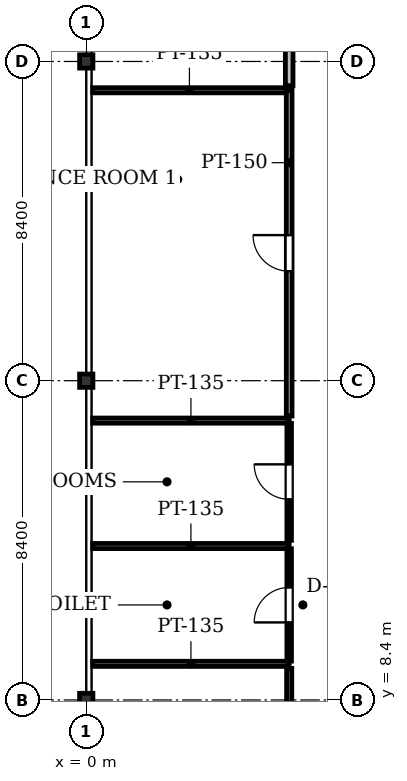
"""IFC4 building model, lengths in metres.
Left out: names, types, materials, properties, quantities, classifications, styles, units other than length and angle.
Written with IfcOpenShell. Run it as: python <this file> out.ifc"""

import sys

from ifc_helpers import new_model, si_unit, direction, frame, frame_2d, origin, origin_2d, place, context, subcontext, project, spatial, rectangle, i_section, extrude, element, fill, save


model = new_model("IFC4")
c1 = context("Model", 3, precision=1e-05, world=origin(), true_north=direction((0.0, 1.0)))
c2 = subcontext(c1, "Body", "Model", "MODEL_VIEW")
j1 = project(units=[si_unit("LENGTHUNIT", "METRE"), si_unit("PLANEANGLEUNIT", "RADIAN")], contexts=[c1])
p1 = place(None, origin())
s1 = spatial("IfcSite", under=j1, at=p1, CompositionType="ELEMENT")
p2 = place(p1, origin())
s2 = spatial("IfcBuilding", under=s1, at=p2, CompositionType="ELEMENT")
p3 = place(p2, frame((0.0, 0.0, 167.3)))
s3 = spatial("IfcBuildingStorey", under=s2, at=p3, CompositionType="ELEMENT", Elevation=167.3)
for number, where, z_axis, x_axis in (
    (1, (0.0, 8.4, 0.0), (0.0, 0.0, 1.0), (1.0, 0.0, 0.0)),
    (2, (0.0, 16.8, 0.0), (0.0, 0.0, 1.0), (1.0, 0.0, 0.0)),
    (3, (0.0, 25.2, 0.0), (0.0, 0.0, 1.0), (1.0, 0.0, 0.0)),
):
    element("IfcColumn", number, at=place(p3, frame(where, z_axis=z_axis, x_axis=x_axis)), inside=s3, PredefinedType="COLUMN", context=c2, shape_type="SweptSolid", body=[
        extrude(i_section(OverallWidth=0.35, OverallDepth=0.35, WebThickness=0.02, FlangeThickness=0.032, at=origin_2d()), origin(), (0.0, 0.0, 1.0), 4.1),
    ])
for number, where, z_axis, x_axis in (
    (4, (5.34, 12.45, 0.0), (0.0, 0.0, 1.0), (-1.0, 0.0, 0.0)),
    (5, (0.169, 9.35, 0.0), (0.0, 0.0, 1.0), (1.0, 0.0, 0.0)),
):
    element("IfcWall", number, at=place(p3, frame(where, z_axis=z_axis, x_axis=x_axis)), inside=s3, PredefinedType="PARTITIONING", context=c2, shape_type="SweptSolid", body=[
        extrude(rectangle(XDim=5.171, YDim=0.135, at=frame_2d((2.585, 0.0))), origin(), (0.0, 0.0, 1.0), 3.518),
    ])
p4 = place(p3, frame((5.34, 9.421, 0.0), z_axis=(0.0, 0.0, 1.0), x_axis=(0.0, 1.0, 0.0)))
e6 = element("IfcWall", 6, at=p4, inside=s3, PredefinedType="PARTITIONING", context=c2, shape_type="SweptSolid", body=[
    extrude(rectangle(XDim=2.957, YDim=0.12, at=frame_2d((1.479, 0.0))), origin(), (0.0, 0.0, 1.0), 3.825),
])
p5 = place(p4, frame((1.019, 0.0, 0.0)))
e7 = element("IfcOpeningElement", 7, at=p5, cuts=e6, PredefinedType="OPENING", context=c2, shape_type="SweptSolid", body=[
    extrude(rectangle(XDim=0.92, YDim=2.1, at=frame_2d((0.46, 1.05))), frame((0.0, 0.07, 0.0), z_axis=(0.0, -1.0, 0.0), x_axis=(1.0, 0.0, 0.0)), (0.0, 0.0, 1.0), 0.14),
])
p6 = place(p3, frame((5.34, 15.75, 0.0), z_axis=(0.0, 0.0, 1.0), x_axis=(-1.0, 0.0, 0.0)))
e8 = element("IfcWall", 8, at=p6, inside=s3, PredefinedType="PARTITIONING", context=c2, shape_type="SweptSolid", body=[
    extrude(rectangle(XDim=5.171, YDim=0.135, at=frame_2d((2.585, 0.0))), origin(), (0.0, 0.0, 1.0), 3.518),
])
p7 = place(p3, frame((5.34, 12.6, 0.0), z_axis=(0.0, 0.0, 1.0), x_axis=(0.0, 1.0, 0.0)))
e9 = element("IfcWall", 9, at=p7, inside=s3, PredefinedType="PARTITIONING", context=c2, shape_type="SweptSolid", body=[
    extrude(rectangle(XDim=3.078, YDim=0.12, at=frame_2d((1.539, 0.0))), origin(), (0.0, 0.0, 1.0), 3.825),
])
p8 = place(p7, frame((1.079, 0.0, 0.0)))
e10 = element("IfcOpeningElement", 10, at=p8, cuts=e9, PredefinedType="OPENING", context=c2, shape_type="SweptSolid", body=[
    extrude(rectangle(XDim=0.92, YDim=2.1, at=frame_2d((0.46, 1.05))), frame((0.0, 0.07, 0.0), z_axis=(0.0, -1.0, 0.0), x_axis=(1.0, 0.0, 0.0)), (0.0, 0.0, 1.0), 0.14),
])
p9 = place(p3, frame((5.34, 15.87, 0.0), z_axis=(0.0, 0.0, 1.0), x_axis=(0.0, 1.0, 0.0)))
e11 = element("IfcWall", 11, at=p9, inside=s3, PredefinedType="PARTITIONING", context=c2, shape_type="SweptSolid", body=[
    extrude(rectangle(XDim=8.572, YDim=0.15, at=frame_2d((4.286, 0.0))), origin(), (0.0, 0.0, 1.0), 2.425),
])
p10 = place(p9, frame((3.811, 0.0, 0.0)))
e12 = element("IfcOpeningElement", 12, at=p10, cuts=e11, PredefinedType="OPENING", context=c2, shape_type="SweptSolid", body=[
    extrude(rectangle(XDim=0.95, YDim=2.15, at=frame_2d((0.475, 1.075))), frame((0.0, 0.085, 0.0), z_axis=(0.0, -1.0, 0.0), x_axis=(1.0, 0.0, 0.0)), (0.0, 0.0, 1.0), 0.17),
])
p11 = place(p3, frame((5.261, 24.442, 0.0), z_axis=(0.0, 0.0, 1.0), x_axis=(-1.0, 0.0, 0.0)))
e13 = element("IfcWall", 13, at=p11, inside=s3, PredefinedType="PARTITIONING", context=c2, shape_type="SweptSolid", body=[
    extrude(rectangle(XDim=5.092, YDim=0.135, at=frame_2d((2.546, 0.0))), origin(), (0.0, 0.0, 1.0), 3.518),
])
p12 = place(p3, frame((5.34, 5.4, 0.0), z_axis=(0.0, 0.0, 1.0), x_axis=(0.0, 1.0, 0.0)))
e14 = element("IfcWall", 14, at=p12, inside=s3, PredefinedType="PARTITIONING", context=c2, shape_type="SweptSolid", body=[
    extrude(rectangle(XDim=3.83, YDim=0.135, at=frame_2d((1.915, 0.0))), origin(), (0.0, 0.0, 1.0), 2.425),
])
p13 = place(p3, frame((5.34, 24.562, 0.0), z_axis=(0.0, 0.0, 1.0), x_axis=(0.0, 1.0, 0.0)))
e15 = element("IfcWall", 15, at=p13, inside=s3, PredefinedType="PARTITIONING", context=c2, shape_type="SweptSolid", body=[
    extrude(rectangle(XDim=20.638, YDim=0.2, at=frame_2d((10.319, 0.0))), origin(), (0.0, 0.0, 1.0), 2.425),
])
p14 = place(p5, origin())
e16 = element("IfcDoor", 16, at=p14, inside=s3, OperationType="SINGLE_SWING_LEFT", PredefinedType="DOOR", context=c2, shape_type="SweptSolid", body=[
    extrude(rectangle(XDim=0.92, YDim=2.1, at=frame_2d((0.46, 1.05))), frame((0.0, 0.025, 0.0), z_axis=(0.0, -1.0, 0.0), x_axis=(1.0, 0.0, 0.0)), (0.0, 0.0, 1.0), 0.05),
])
fill(e7, e16)
p15 = place(p8, origin())
e17 = element("IfcDoor", 17, at=p15, inside=s3, OperationType="SINGLE_SWING_RIGHT", PredefinedType="DOOR", context=c2, shape_type="SweptSolid", body=[
    extrude(rectangle(XDim=0.92, YDim=2.1, at=frame_2d((0.46, 1.05))), frame((0.0, 0.025, 0.0), z_axis=(0.0, -1.0, 0.0), x_axis=(1.0, 0.0, 0.0)), (0.0, 0.0, 1.0), 0.05),
])
fill(e10, e17)
p16 = place(p10, origin())
e18 = element("IfcDoor", 18, at=p16, inside=s3, OperationType="SINGLE_SWING_RIGHT", PredefinedType="DOOR", context=c2, shape_type="SweptSolid", body=[
    extrude(rectangle(XDim=0.95, YDim=2.15, at=frame_2d((0.475, 1.075))), frame((0.0, 0.025, 0.0), z_axis=(0.0, -1.0, 0.0), x_axis=(1.0, 0.0, 0.0)), (0.0, 0.0, 1.0), 0.05),
])
fill(e12, e18)
save(model, sys.argv[1])
